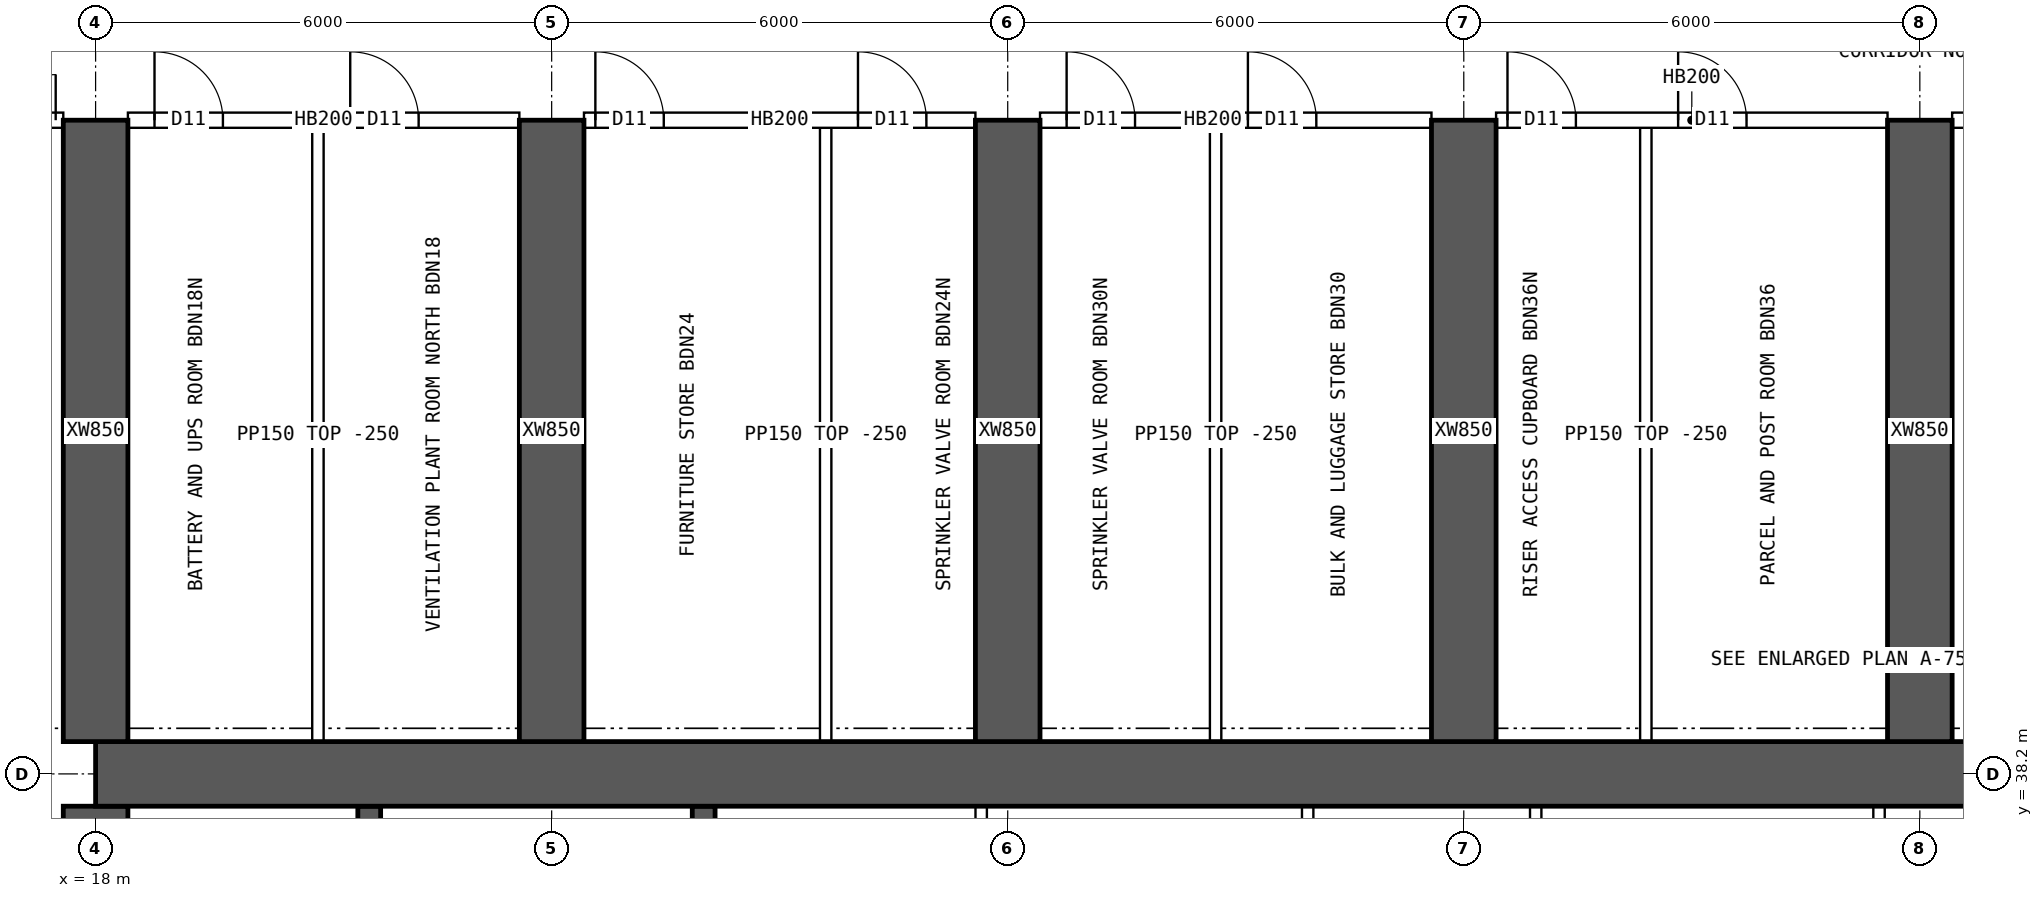
"""IFC4 building model, lengths in metres.
Left out: names, types, materials, properties, quantities, classifications, styles, units other than length and angle.
Written with IfcOpenShell. Run it as: python <this file> out.ifc"""

import sys

from ifc_helpers import new_model, si_unit, direction, frame, frame_2d, origin, place, context, subcontext, project, spatial, rectangle, extrude, element, fill, save


model = new_model("IFC4")
c1 = context("Model", 3, precision=1e-05, world=origin(), true_north=direction((0.0, 1.0)))
c2 = subcontext(c1, "Body", "Model", "MODEL_VIEW")
j1 = project(units=[si_unit("LENGTHUNIT", "METRE"), si_unit("PLANEANGLEUNIT", "RADIAN")], contexts=[c1])
p1 = place(None, origin())
s1 = spatial("IfcSite", under=j1, at=p1, CompositionType="ELEMENT")
p2 = place(p1, origin())
s2 = spatial("IfcBuilding", under=s1, at=p2, CompositionType="ELEMENT")
p3 = place(p2, frame((0.0, 0.0, 193.6)))
s3 = spatial("IfcBuildingStorey", under=s2, at=p3, CompositionType="ELEMENT", Elevation=193.6)
p4 = place(p3, frame((18.0, 38.2, 0.0), z_axis=(0.0, 0.0, 1.0), x_axis=(1.0, 0.0, 0.0)))
e1 = element("IfcWall", 1, at=p4, inside=s3, PredefinedType="SHEAR", context=c2, shape_type="SweptSolid", body=[
    extrude(rectangle(XDim=48.0, YDim=0.85, at=frame_2d((24.0, 0.0))), origin(), (0.0, 0.0, 1.0), 3.75),
])
p5 = place(p3, frame((18.0, 26.225, 0.0), z_axis=(0.0, 0.0, 1.0), x_axis=(0.0, 1.0, 0.0)))
e2 = element("IfcWall", 2, at=p5, inside=s3, PredefinedType="SHEAR", context=c2, shape_type="SweptSolid", body=[
    extrude(rectangle(XDim=11.55, YDim=0.85, at=frame_2d((5.775, 0.0))), origin(), (0.0, 0.0, 1.0), 3.75),
])
p6 = place(p5, frame((5.075, 0.0, 0.0)))
e3 = element("IfcOpeningElement", 3, at=p6, cuts=e2, PredefinedType="OPENING", context=c2, shape_type="SweptSolid", body=[
    extrude(rectangle(XDim=1.2, YDim=2.1, at=frame_2d((0.6, 1.05))), frame((0.0, 0.435, 0.0), z_axis=(0.0, -1.0, 0.0), x_axis=(1.0, 0.0, 0.0)), (0.0, 0.0, 1.0), 0.87),
])
for number, where, z_axis, x_axis in (
    (4, (21.6, 34.75, 0.0), (0.0, 0.0, 1.0), (0.0, 1.0, 0.0)),
    (5, (26.0, 34.75, 0.0), (0.0, 0.0, 1.0), (0.0, 1.0, 0.0)),
):
    element("IfcWall", number, at=place(p3, frame(where, z_axis=z_axis, x_axis=x_axis)), inside=s3, PredefinedType="SHEAR", context=c2, shape_type="SweptSolid", body=[
        extrude(rectangle(XDim=3.025, YDim=0.3, at=frame_2d((1.512, 0.0))), origin(), (0.0, 0.0, 1.0), 3.75),
    ])
for number, where, z_axis, x_axis in (
    (6, (18.0, 38.625, 0.0), (0.0, 0.0, 1.0), (0.0, 1.0, 0.0)),
    (7, (24.0, 38.625, 0.0), (0.0, 0.0, 1.0), (0.0, 1.0, 0.0)),
    (8, (30.0, 38.625, 0.0), (0.0, 0.0, 1.0), (0.0, 1.0, 0.0)),
    (9, (36.0, 38.625, 0.0), (0.0, 0.0, 1.0), (0.0, 1.0, 0.0)),
    (10, (42.0, 38.625, 0.0), (0.0, 0.0, 1.0), (0.0, 1.0, 0.0)),
):
    element("IfcWall", number, at=place(p3, frame(where, z_axis=z_axis, x_axis=x_axis)), inside=s3, PredefinedType="SHEAR", context=c2, shape_type="SweptSolid", body=[
        extrude(rectangle(XDim=8.175, YDim=0.85, at=frame_2d((4.087, 0.0))), origin(), (0.0, 0.0, 1.0), 3.75),
    ])
for number, where, z_axis, x_axis in (
    (11, (29.651, 34.75, 0.0), (0.0, 0.0, 1.0), (0.0, 1.0, 0.0)),
    (12, (33.946, 34.75, 0.0), (0.0, 0.0, 1.0), (0.0, 1.0, 0.0)),
    (13, (36.946, 34.75, 0.0), (0.0, 0.0, 1.0), (0.0, 1.0, 0.0)),
    (14, (41.463, 34.75, 0.0), (0.0, 0.0, 1.0), (0.0, 1.0, 0.0)),
):
    element("IfcWall", number, at=place(p3, frame(where, z_axis=z_axis, x_axis=x_axis)), inside=s3, PredefinedType="SOLIDWALL", context=c2, shape_type="SweptSolid", body=[
        extrude(rectangle(XDim=3.025, YDim=0.15, at=frame_2d((1.512, 0.0))), origin(), (0.0, 0.0, 1.0), 3.5),
    ])
p7 = place(p3, frame((15.6, 46.8, 0.0), z_axis=(0.0, 0.0, 1.0), x_axis=(1.0, 0.0, 0.0)))
e15 = element("IfcWall", 15, at=p7, inside=s3, PredefinedType="SOLIDWALL", context=c2, shape_type="SweptSolid", body=[
    extrude(rectangle(XDim=1.975, YDim=0.2, at=frame_2d((0.987, 0.0))), origin(), (0.0, 0.0, 1.0), 3.5),
])
p8 = place(p7, frame((0.675, 0.0, 0.0)))
e16 = element("IfcOpeningElement", 16, at=p8, cuts=e15, PredefinedType="OPENING", context=c2, shape_type="SweptSolid", body=[
    extrude(rectangle(XDim=1.2, YDim=2.1, at=frame_2d((0.6, 1.05))), frame((0.0, 0.11, 0.0), z_axis=(0.0, -1.0, 0.0), x_axis=(1.0, 0.0, 0.0)), (0.0, 0.0, 1.0), 0.22),
])
p9 = place(p3, frame((18.425, 46.8, 0.0), z_axis=(0.0, 0.0, 1.0), x_axis=(1.0, 0.0, 0.0)))
e17 = element("IfcWall", 17, at=p9, inside=s3, PredefinedType="SOLIDWALL", context=c2, shape_type="SweptSolid", body=[
    extrude(rectangle(XDim=5.15, YDim=0.2, at=frame_2d((2.575, 0.0))), origin(), (0.0, 0.0, 1.0), 3.5),
])
p10 = place(p9, frame((0.35, 0.0, 0.0)))
e18 = element("IfcOpeningElement", 18, at=p10, cuts=e17, PredefinedType="OPENING", context=c2, shape_type="SweptSolid", body=[
    extrude(rectangle(XDim=0.9, YDim=2.1, at=frame_2d((0.45, 1.05))), frame((0.0, 0.11, 0.0), z_axis=(0.0, -1.0, 0.0), x_axis=(1.0, 0.0, 0.0)), (0.0, 0.0, 1.0), 0.22),
])
p11 = place(p9, frame((2.925, 0.0, 0.0)))
e19 = element("IfcOpeningElement", 19, at=p11, cuts=e17, PredefinedType="OPENING", context=c2, shape_type="SweptSolid", body=[
    extrude(rectangle(XDim=0.9, YDim=2.1, at=frame_2d((0.45, 1.05))), frame((0.0, 0.11, 0.0), z_axis=(0.0, -1.0, 0.0), x_axis=(1.0, 0.0, 0.0)), (0.0, 0.0, 1.0), 0.22),
])
p12 = place(p3, frame((24.425, 46.8, 0.0), z_axis=(0.0, 0.0, 1.0), x_axis=(1.0, 0.0, 0.0)))
e20 = element("IfcWall", 20, at=p12, inside=s3, PredefinedType="SOLIDWALL", context=c2, shape_type="SweptSolid", body=[
    extrude(rectangle(XDim=5.15, YDim=0.2, at=frame_2d((2.575, 0.0))), origin(), (0.0, 0.0, 1.0), 3.5),
])
p13 = place(p12, frame((0.15, 0.0, 0.0)))
e21 = element("IfcOpeningElement", 21, at=p13, cuts=e20, PredefinedType="OPENING", context=c2, shape_type="SweptSolid", body=[
    extrude(rectangle(XDim=0.9, YDim=2.1, at=frame_2d((0.45, 1.05))), frame((0.0, 0.11, 0.0), z_axis=(0.0, -1.0, 0.0), x_axis=(1.0, 0.0, 0.0)), (0.0, 0.0, 1.0), 0.22),
])
p14 = place(p12, frame((3.605, 0.0, 0.0)))
e22 = element("IfcOpeningElement", 22, at=p14, cuts=e20, PredefinedType="OPENING", context=c2, shape_type="SweptSolid", body=[
    extrude(rectangle(XDim=0.9, YDim=2.1, at=frame_2d((0.45, 1.05))), frame((0.0, 0.11, 0.0), z_axis=(0.0, -1.0, 0.0), x_axis=(1.0, 0.0, 0.0)), (0.0, 0.0, 1.0), 0.22),
])
p15 = place(p3, frame((30.425, 46.8, 0.0), z_axis=(0.0, 0.0, 1.0), x_axis=(1.0, 0.0, 0.0)))
e23 = element("IfcWall", 23, at=p15, inside=s3, PredefinedType="SOLIDWALL", context=c2, shape_type="SweptSolid", body=[
    extrude(rectangle(XDim=5.15, YDim=0.2, at=frame_2d((2.575, 0.0))), origin(), (0.0, 0.0, 1.0), 3.5),
])
p16 = place(p15, frame((0.35, 0.0, 0.0)))
e24 = element("IfcOpeningElement", 24, at=p16, cuts=e23, PredefinedType="OPENING", context=c2, shape_type="SweptSolid", body=[
    extrude(rectangle(XDim=0.9, YDim=2.1, at=frame_2d((0.45, 1.05))), frame((0.0, 0.11, 0.0), z_axis=(0.0, -1.0, 0.0), x_axis=(1.0, 0.0, 0.0)), (0.0, 0.0, 1.0), 0.22),
])
p17 = place(p15, frame((2.735, 0.0, 0.0)))
e25 = element("IfcOpeningElement", 25, at=p17, cuts=e23, PredefinedType="OPENING", context=c2, shape_type="SweptSolid", body=[
    extrude(rectangle(XDim=0.9, YDim=2.1, at=frame_2d((0.45, 1.05))), frame((0.0, 0.11, 0.0), z_axis=(0.0, -1.0, 0.0), x_axis=(1.0, 0.0, 0.0)), (0.0, 0.0, 1.0), 0.22),
])
p18 = place(p3, frame((36.425, 46.8, 0.0), z_axis=(0.0, 0.0, 1.0), x_axis=(1.0, 0.0, 0.0)))
e26 = element("IfcWall", 26, at=p18, inside=s3, PredefinedType="SOLIDWALL", context=c2, shape_type="SweptSolid", body=[
    extrude(rectangle(XDim=5.15, YDim=0.2, at=frame_2d((2.575, 0.0))), origin(), (0.0, 0.0, 1.0), 3.5),
])
p19 = place(p18, frame((0.15, 0.0, 0.0)))
e27 = element("IfcOpeningElement", 27, at=p19, cuts=e26, PredefinedType="OPENING", context=c2, shape_type="SweptSolid", body=[
    extrude(rectangle(XDim=0.9, YDim=2.1, at=frame_2d((0.45, 1.05))), frame((0.0, 0.11, 0.0), z_axis=(0.0, -1.0, 0.0), x_axis=(1.0, 0.0, 0.0)), (0.0, 0.0, 1.0), 0.22),
])
p20 = place(p18, frame((2.395, 0.0, 0.0)))
e28 = element("IfcOpeningElement", 28, at=p20, cuts=e26, PredefinedType="OPENING", context=c2, shape_type="SweptSolid", body=[
    extrude(rectangle(XDim=0.9, YDim=2.1, at=frame_2d((0.45, 1.05))), frame((0.0, 0.11, 0.0), z_axis=(0.0, -1.0, 0.0), x_axis=(1.0, 0.0, 0.0)), (0.0, 0.0, 1.0), 0.22),
])
p21 = place(p3, frame((42.425, 46.8, 0.0), z_axis=(0.0, 0.0, 1.0), x_axis=(1.0, 0.0, 0.0)))
e29 = element("IfcWall", 29, at=p21, inside=s3, PredefinedType="SOLIDWALL", context=c2, shape_type="SweptSolid", body=[
    extrude(rectangle(XDim=5.15, YDim=0.2, at=frame_2d((2.575, 0.0))), origin(), (0.0, 0.0, 1.0), 3.5),
])
p22 = place(p21, frame((0.35, 0.0, 0.0)))
e30 = element("IfcOpeningElement", 30, at=p22, cuts=e29, PredefinedType="OPENING", context=c2, shape_type="SweptSolid", body=[
    extrude(rectangle(XDim=0.9, YDim=2.1, at=frame_2d((0.45, 1.05))), frame((0.0, 0.11, 0.0), z_axis=(0.0, -1.0, 0.0), x_axis=(1.0, 0.0, 0.0)), (0.0, 0.0, 1.0), 0.22),
])
p23 = place(p21, frame((3.925, 0.0, 0.0)))
e31 = element("IfcOpeningElement", 31, at=p23, cuts=e29, PredefinedType="OPENING", context=c2, shape_type="SweptSolid", body=[
    extrude(rectangle(XDim=0.9, YDim=2.1, at=frame_2d((0.45, 1.05))), frame((0.0, 0.11, 0.0), z_axis=(0.0, -1.0, 0.0), x_axis=(1.0, 0.0, 0.0)), (0.0, 0.0, 1.0), 0.22),
])
for number, where, z_axis, x_axis in (
    (32, (20.925, 38.625, 0.0), (0.0, 0.0, 1.0), (0.0, 1.0, 0.0)),
    (33, (27.605, 38.625, 0.0), (0.0, 0.0, 1.0), (0.0, 1.0, 0.0)),
    (34, (32.735, 38.625, 0.0), (0.0, 0.0, 1.0), (0.0, 1.0, 0.0)),
    (35, (38.395, 38.625, 0.0), (0.0, 0.0, 1.0), (0.0, 1.0, 0.0)),
):
    element("IfcWall", number, at=place(p3, frame(where, z_axis=z_axis, x_axis=x_axis)), inside=s3, PredefinedType="PARTITIONING", context=c2, shape_type="SweptSolid", body=[
        extrude(rectangle(XDim=8.075, YDim=0.15, at=frame_2d((4.038, 0.0))), origin(), (0.0, 0.0, 1.0), 3.5),
    ])
p24 = place(p8, origin())
e36 = element("IfcDoor", 36, at=p24, inside=s3, OperationType="DOUBLE_DOOR_SINGLE_SWING", PredefinedType="DOOR", context=c2, shape_type="SweptSolid", body=[
    extrude(rectangle(XDim=1.2, YDim=2.1, at=frame_2d((0.6, 1.05))), frame((0.0, 0.025, 0.0), z_axis=(0.0, -1.0, 0.0), x_axis=(1.0, 0.0, 0.0)), (0.0, 0.0, 1.0), 0.05),
])
fill(e16, e36)
p25 = place(p10, origin())
e37 = element("IfcDoor", 37, at=p25, inside=s3, OperationType="SINGLE_SWING_LEFT", PredefinedType="DOOR", context=c2, shape_type="SweptSolid", body=[
    extrude(rectangle(XDim=0.9, YDim=2.1, at=frame_2d((0.45, 1.05))), frame((0.0, 0.025, 0.0), z_axis=(0.0, -1.0, 0.0), x_axis=(1.0, 0.0, 0.0)), (0.0, 0.0, 1.0), 0.05),
])
fill(e18, e37)
p26 = place(p11, origin())
e38 = element("IfcDoor", 38, at=p26, inside=s3, OperationType="SINGLE_SWING_LEFT", PredefinedType="DOOR", context=c2, shape_type="SweptSolid", body=[
    extrude(rectangle(XDim=0.9, YDim=2.1, at=frame_2d((0.45, 1.05))), frame((0.0, 0.025, 0.0), z_axis=(0.0, -1.0, 0.0), x_axis=(1.0, 0.0, 0.0)), (0.0, 0.0, 1.0), 0.05),
])
fill(e19, e38)
p27 = place(p13, origin())
e39 = element("IfcDoor", 39, at=p27, inside=s3, OperationType="SINGLE_SWING_LEFT", PredefinedType="DOOR", context=c2, shape_type="SweptSolid", body=[
    extrude(rectangle(XDim=0.9, YDim=2.1, at=frame_2d((0.45, 1.05))), frame((0.0, 0.025, 0.0), z_axis=(0.0, -1.0, 0.0), x_axis=(1.0, 0.0, 0.0)), (0.0, 0.0, 1.0), 0.05),
])
fill(e21, e39)
p28 = place(p14, origin())
e40 = element("IfcDoor", 40, at=p28, inside=s3, OperationType="SINGLE_SWING_LEFT", PredefinedType="DOOR", context=c2, shape_type="SweptSolid", body=[
    extrude(rectangle(XDim=0.9, YDim=2.1, at=frame_2d((0.45, 1.05))), frame((0.0, 0.025, 0.0), z_axis=(0.0, -1.0, 0.0), x_axis=(1.0, 0.0, 0.0)), (0.0, 0.0, 1.0), 0.05),
])
fill(e22, e40)
p29 = place(p16, origin())
e41 = element("IfcDoor", 41, at=p29, inside=s3, OperationType="SINGLE_SWING_LEFT", PredefinedType="DOOR", context=c2, shape_type="SweptSolid", body=[
    extrude(rectangle(XDim=0.9, YDim=2.1, at=frame_2d((0.45, 1.05))), frame((0.0, 0.025, 0.0), z_axis=(0.0, -1.0, 0.0), x_axis=(1.0, 0.0, 0.0)), (0.0, 0.0, 1.0), 0.05),
])
fill(e24, e41)
p30 = place(p17, origin())
e42 = element("IfcDoor", 42, at=p30, inside=s3, OperationType="SINGLE_SWING_LEFT", PredefinedType="DOOR", context=c2, shape_type="SweptSolid", body=[
    extrude(rectangle(XDim=0.9, YDim=2.1, at=frame_2d((0.45, 1.05))), frame((0.0, 0.025, 0.0), z_axis=(0.0, -1.0, 0.0), x_axis=(1.0, 0.0, 0.0)), (0.0, 0.0, 1.0), 0.05),
])
fill(e25, e42)
p31 = place(p19, origin())
e43 = element("IfcDoor", 43, at=p31, inside=s3, OperationType="SINGLE_SWING_LEFT", PredefinedType="DOOR", context=c2, shape_type="SweptSolid", body=[
    extrude(rectangle(XDim=0.9, YDim=2.1, at=frame_2d((0.45, 1.05))), frame((0.0, 0.025, 0.0), z_axis=(0.0, -1.0, 0.0), x_axis=(1.0, 0.0, 0.0)), (0.0, 0.0, 1.0), 0.05),
])
fill(e27, e43)
p32 = place(p20, origin())
e44 = element("IfcDoor", 44, at=p32, inside=s3, OperationType="SINGLE_SWING_LEFT", PredefinedType="DOOR", context=c2, shape_type="SweptSolid", body=[
    extrude(rectangle(XDim=0.9, YDim=2.1, at=frame_2d((0.45, 1.05))), frame((0.0, 0.025, 0.0), z_axis=(0.0, -1.0, 0.0), x_axis=(1.0, 0.0, 0.0)), (0.0, 0.0, 1.0), 0.05),
])
fill(e28, e44)
save(model, sys.argv[1])
